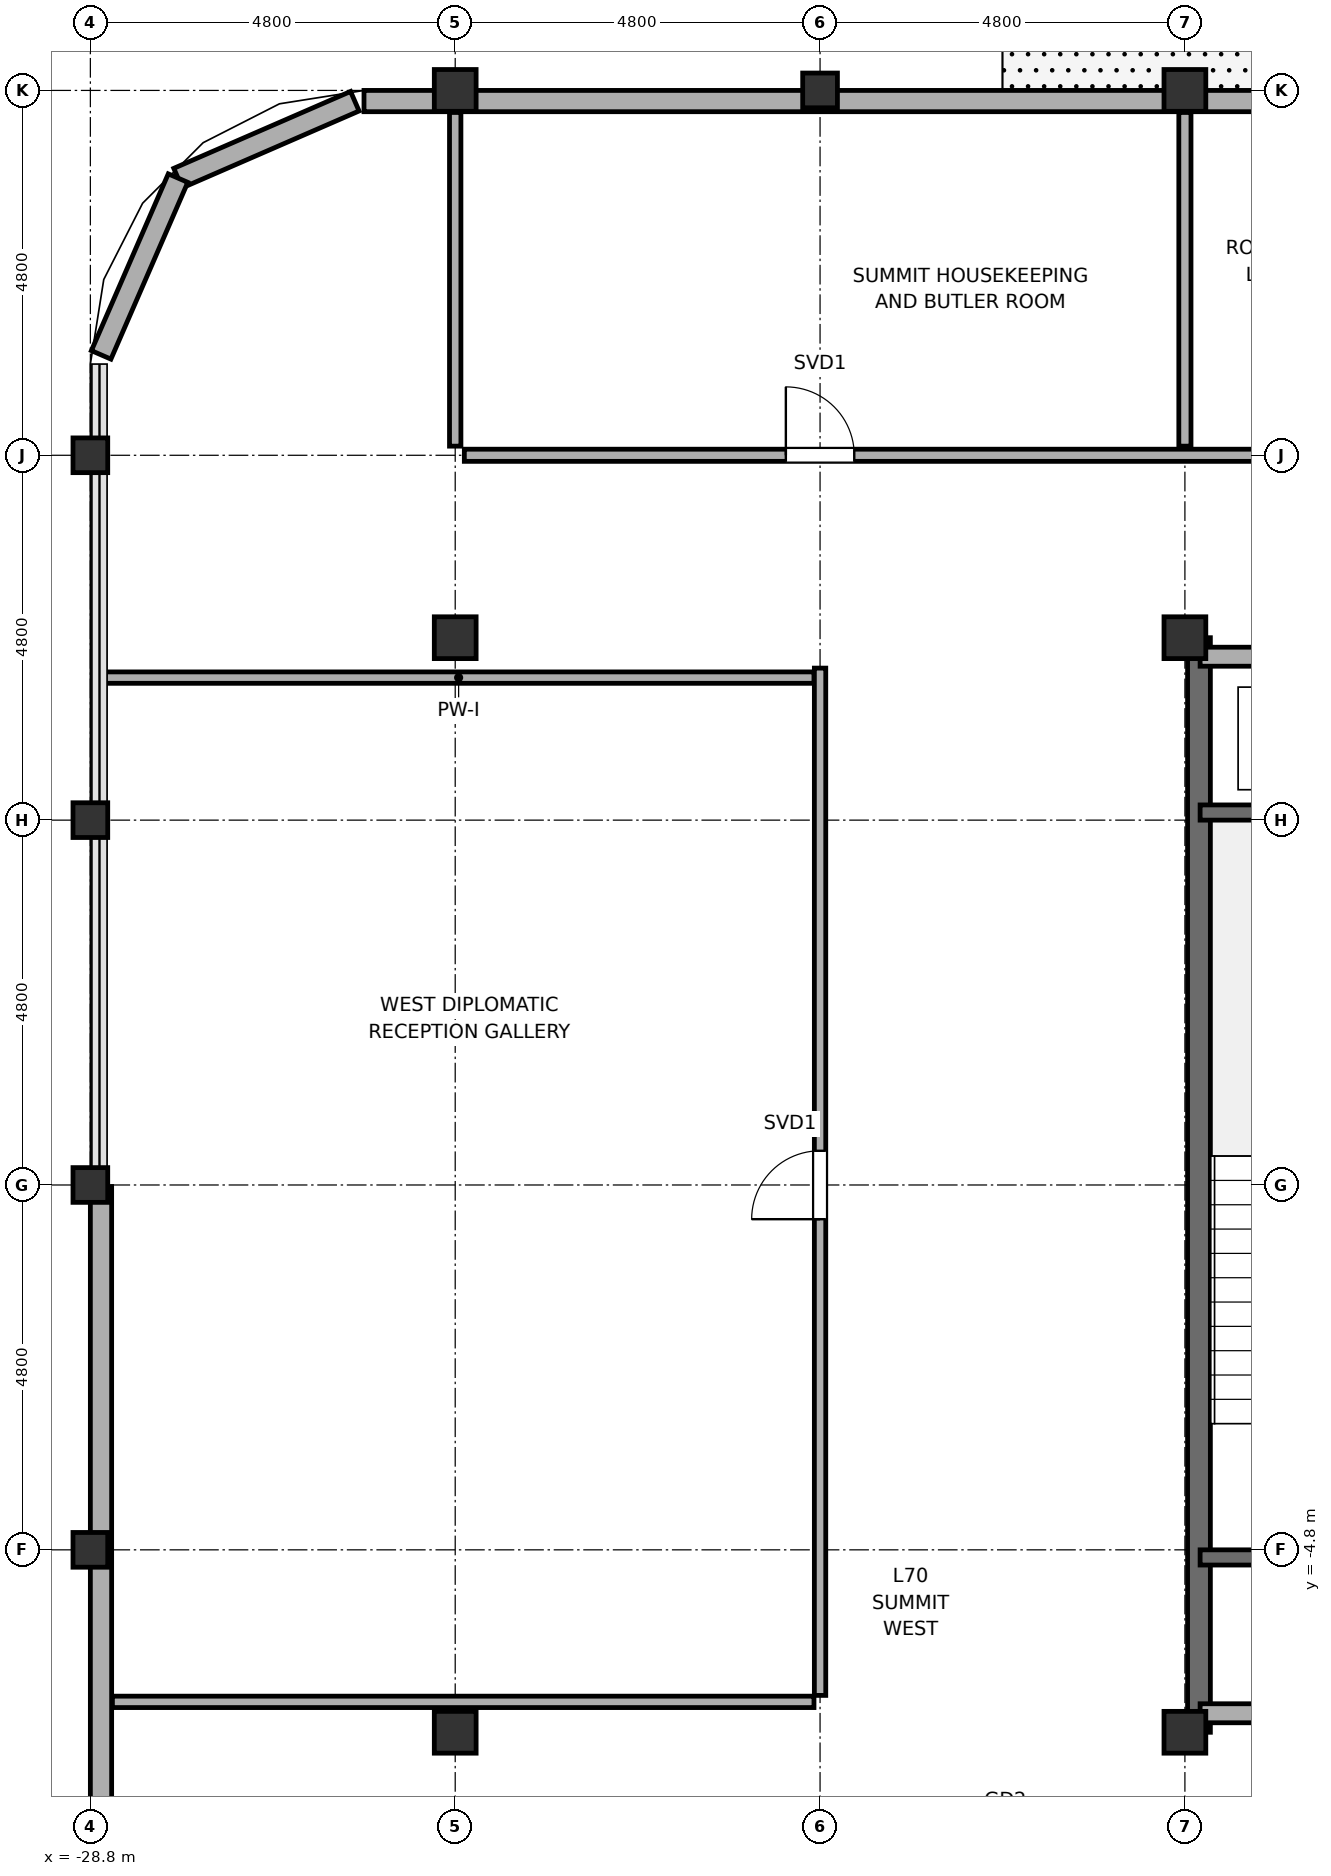
"""IFC4 building model, lengths in metres.
Left out: names, types, materials, properties, quantities, classifications, styles, units other than length and angle.
Written with IfcOpenShell. Run it as: python <this file> out.ifc"""

import sys

from ifc_helpers import new_model, si_unit, direction, frame, frame_2d, origin, origin_2d, place, context, subcontext, project, spatial, rectangle, hollow_rectangle, hollow_circle, extrude, element, fill, save


model = new_model("IFC4")
c1 = context("Model", 3, precision=1e-05, world=origin(), true_north=direction((0.0, 1.0)))
c2 = subcontext(c1, "Body", "Model", "MODEL_VIEW")
j1 = project(units=[si_unit("LENGTHUNIT", "METRE"), si_unit("PLANEANGLEUNIT", "RADIAN")], contexts=[c1])
p1 = place(None, origin())
s1 = spatial("IfcSite", under=j1, at=p1, CompositionType="ELEMENT")
p2 = place(p1, origin())
s2 = spatial("IfcBuilding", under=s1, at=p2, CompositionType="ELEMENT")
p3 = place(p2, frame((0.0, 0.0, 282.2)))
s3 = spatial("IfcBuildingStorey", under=s2, at=p3, CompositionType="ELEMENT", Elevation=282.2)
for number, where, z_axis, x_axis in (
    (1, (-28.8, -4.8, 0.0), (0.0, 0.0, 1.0), (1.0, 0.0, 0.0)),
    (2, (-28.8, 0.0, 0.0), (0.0, 0.0, 1.0), (1.0, 0.0, 0.0)),
    (3, (-28.8, 4.8, 0.0), (0.0, 0.0, 1.0), (1.0, 0.0, 0.0)),
    (4, (-28.8, 9.6, 0.0), (0.0, 0.0, 1.0), (1.0, 0.0, 0.0)),
):
    element("IfcColumn", number, at=place(p3, frame(where, z_axis=z_axis, x_axis=x_axis)), inside=s3, PredefinedType="COLUMN", context=c2, shape_type="SweptSolid", body=[
        extrude(hollow_circle(Radius=0.229, WallThickness=0.02, at=origin_2d()), origin(), (0.0, 0.0, 1.0), 4.2),
    ])
for number, where, z_axis, x_axis in (
    (5, (-24.0, -7.2, 0.0), (0.0, 0.0, 1.0), (1.0, 0.0, 0.0)),
    (6, (-24.0, 7.2, 0.0), (0.0, 0.0, 1.0), (1.0, 0.0, 0.0)),
    (7, (-24.0, 14.4, 0.0), (0.0, 0.0, 1.0), (1.0, 0.0, 0.0)),
):
    element("IfcColumn", number, at=place(p3, frame(where, z_axis=z_axis, x_axis=x_axis)), inside=s3, PredefinedType="COLUMN", context=c2, shape_type="SweptSolid", body=[
        extrude(hollow_rectangle(XDim=0.55, YDim=0.55, WallThickness=0.025, at=origin_2d()), origin(), (0.0, 0.0, 1.0), 4.2),
    ])
p4 = place(p3, frame((-19.2, 14.4, 0.0), z_axis=(0.0, 0.0, 1.0), x_axis=(1.0, 0.0, 0.0)))
e8 = element("IfcColumn", 8, at=p4, inside=s3, PredefinedType="COLUMN", context=c2, shape_type="SweptSolid", body=[
    extrude(hollow_circle(Radius=0.229, WallThickness=0.02, at=origin_2d()), origin(), (0.0, 0.0, 1.0), 4.2),
])
for number, where, z_axis, x_axis in (
    (9, (-14.4, -7.2, 0.0), (0.0, 0.0, 1.0), (1.0, 0.0, 0.0)),
    (10, (-14.4, 7.2, 0.0), (0.0, 0.0, 1.0), (1.0, 0.0, 0.0)),
    (11, (-14.4, 14.4, 0.0), (0.0, 0.0, 1.0), (1.0, 0.0, 0.0)),
):
    element("IfcColumn", number, at=place(p3, frame(where, z_axis=z_axis, x_axis=x_axis)), inside=s3, PredefinedType="COLUMN", context=c2, shape_type="SweptSolid", body=[
        extrude(hollow_rectangle(XDim=0.55, YDim=0.55, WallThickness=0.025, at=origin_2d()), origin(), (0.0, 0.0, 1.0), 4.2),
    ])
p5 = place(p3, frame((-14.215, -7.2, -0.2), z_axis=(0.0, 0.0, 1.0), x_axis=(0.0, 1.0, 0.0)))
e12 = element("IfcWall", 12, at=p5, inside=s3, PredefinedType="SHEAR", context=c2, shape_type="SweptSolid", body=[
    extrude(rectangle(XDim=14.4, YDim=0.3, at=frame_2d((7.2, 0.0))), origin(), (0.0, 0.0, 1.0), 4.2),
])
for number, where, z_axis, x_axis in (
    (13, (-25.321, 14.258, 0.0), (0.0, 0.0, 1.0), (-0.917, -0.399, 0.0)),
    (14, (-27.646, 13.247, 0.0), (0.0, 0.0, 1.0), (-0.399, -0.917, 0.0)),
):
    element("IfcWall", number, at=place(p3, frame(where, z_axis=z_axis, x_axis=x_axis)), inside=s3, PredefinedType="SOLIDWALL", context=c2, shape_type="SweptSolid", body=[
        extrude(rectangle(XDim=2.536, YDim=0.28, at=frame_2d((1.268, 0.0))), origin(), (0.0, 0.0, 1.0), 2.6),
    ])
p6 = place(p3, frame((-25.2, 14.26, 0.0), z_axis=(0.0, 0.0, 1.0), x_axis=(1.0, 0.0, 0.0)))
e15 = element("IfcWall", 15, at=p6, inside=s3, PredefinedType="SOLIDWALL", context=c2, shape_type="SweptSolid", body=[
    extrude(rectangle(XDim=20.45, YDim=0.28, at=frame_2d((10.225, 0.0))), origin(), (0.0, 0.0, 1.0), 2.6),
])
p7 = place(p6, frame((12.3, 0.0, 0.0)))
e16 = element("IfcOpeningElement", 16, at=p7, cuts=e15, PredefinedType="OPENING", context=c2, shape_type="SweptSolid", body=[
    extrude(rectangle(XDim=1.8, YDim=2.2, at=frame_2d((0.9, 1.1))), frame((0.0, 0.155, 0.0), z_axis=(0.0, -1.0, 0.0), x_axis=(1.0, 0.0, 0.0)), (0.0, 0.0, 1.0), 0.31),
])
p8 = place(p6, frame((16.54, 0.0, 0.75)))
e17 = element("IfcOpeningElement", 17, at=p8, cuts=e15, PredefinedType="OPENING", context=c2, shape_type="SweptSolid", body=[
    extrude(rectangle(XDim=2.8, YDim=1.7, at=frame_2d((1.4, 0.85))), frame((0.0, 0.155, 0.0), z_axis=(0.0, -1.0, 0.0), x_axis=(1.0, 0.0, 0.0)), (0.0, 0.0, 1.0), 0.31),
])
p9 = place(p3, frame((-28.66, -20.4, 0.0), z_axis=(0.0, 0.0, 1.0), x_axis=(0.0, 1.0, 0.0)))
e18 = element("IfcWall", 18, at=p9, inside=s3, PredefinedType="SOLIDWALL", context=c2, shape_type="SweptSolid", body=[
    extrude(rectangle(XDim=20.38, YDim=0.28, at=frame_2d((10.19, 0.0))), origin(), (0.0, 0.0, 1.0), 2.6),
])
p10 = place(p3, frame((-14.2, -6.95, 0.0), z_axis=(0.0, 0.0, 1.0), x_axis=(1.0, 0.0, 0.0)))
e19 = element("IfcWall", 19, at=p10, inside=s3, PredefinedType="SOLIDWALL", context=c2, shape_type="SweptSolid", body=[
    extrude(rectangle(XDim=9.4, YDim=0.25, at=frame_2d((4.7, 0.0))), origin(), (0.0, 0.0, 1.0), 2.6),
])
p11 = place(p10, frame((4.9, 0.0, 0.0)))
e20 = element("IfcOpeningElement", 20, at=p11, cuts=e19, PredefinedType="OPENING", context=c2, shape_type="SweptSolid", body=[
    extrude(rectangle(XDim=1.0, YDim=2.15, at=frame_2d((0.5, 1.075))), frame((0.0, 0.14, 0.0), z_axis=(0.0, -1.0, 0.0), x_axis=(1.0, 0.0, 0.0)), (0.0, 0.0, 1.0), 0.28),
])
p12 = place(p3, frame((-14.2, 6.95, 0.0), z_axis=(0.0, 0.0, 1.0), x_axis=(1.0, 0.0, 0.0)))
e21 = element("IfcWall", 21, at=p12, inside=s3, PredefinedType="SOLIDWALL", context=c2, shape_type="SweptSolid", body=[
    extrude(rectangle(XDim=9.4, YDim=0.25, at=frame_2d((4.7, 0.0))), origin(), (0.0, 0.0, 1.0), 2.6),
])
p13 = place(p12, frame((4.9, 0.0, 0.0)))
e22 = element("IfcOpeningElement", 22, at=p13, cuts=e21, PredefinedType="OPENING", context=c2, shape_type="SweptSolid", body=[
    extrude(rectangle(XDim=1.0, YDim=2.15, at=frame_2d((0.5, 1.075))), frame((0.0, 0.14, 0.0), z_axis=(0.0, -1.0, 0.0), x_axis=(1.0, 0.0, 0.0)), (0.0, 0.0, 1.0), 0.28),
])
for number, where, z_axis, x_axis in (
    (23, (-14.2, -4.9, -0.2), (0.0, 0.0, 1.0), (1.0, 0.0, 0.0)),
    (24, (-14.2, 4.9, -0.2), (0.0, 0.0, 1.0), (1.0, 0.0, 0.0)),
):
    element("IfcWall", number, at=place(p3, frame(where, z_axis=z_axis, x_axis=x_axis)), inside=s3, PredefinedType="SOLIDWALL", context=c2, shape_type="SweptSolid", body=[
        extrude(rectangle(XDim=3.65, YDim=0.2, at=frame_2d((1.825, 0.0))), origin(), (0.0, 0.0, 1.0), 4.2),
    ])
p14 = place(p3, frame((-28.51, -6.8, 0.0), z_axis=(0.0, 0.0, 1.0), x_axis=(1.0, 0.0, 0.0)))
e25 = element("IfcWall", 25, at=p14, inside=s3, PredefinedType="PARTITIONING", context=c2, shape_type="SweptSolid", body=[
    extrude(rectangle(XDim=9.23, YDim=0.15, at=frame_2d((4.615, 0.0))), origin(), (0.0, 0.0, 1.0), 2.6),
])
p15 = place(p3, frame((-28.63, 6.675, 0.0), z_axis=(0.0, 0.0, 1.0), x_axis=(1.0, 0.0, 0.0)))
e26 = element("IfcWall", 26, at=p15, inside=s3, PredefinedType="PARTITIONING", context=c2, shape_type="SweptSolid", body=[
    extrude(rectangle(XDim=9.35, YDim=0.15, at=frame_2d((4.675, 0.0))), origin(), (0.0, 0.0, 1.0), 3.56),
])
p16 = place(p3, frame((-23.88, 9.6, 0.0), z_axis=(0.0, 0.0, 1.0), x_axis=(1.0, 0.0, 0.0)))
e27 = element("IfcWall", 27, at=p16, inside=s3, PredefinedType="PARTITIONING", context=c2, shape_type="SweptSolid", body=[
    extrude(rectangle(XDim=42.96, YDim=0.16, at=frame_2d((21.48, 0.0))), origin(), (0.0, 0.0, 1.0), 2.6),
])
p17 = place(p16, frame((4.23, 0.0, 0.0)))
e28 = element("IfcOpeningElement", 28, at=p17, cuts=e27, PredefinedType="OPENING", context=c2, shape_type="SweptSolid", body=[
    extrude(rectangle(XDim=0.9, YDim=2.1, at=frame_2d((0.45, 1.05))), frame((0.0, 0.095, 0.0), z_axis=(0.0, -1.0, 0.0), x_axis=(1.0, 0.0, 0.0)), (0.0, 0.0, 1.0), 0.19),
])
p18 = place(p16, frame((11.415, 0.0, 0.0)))
e29 = element("IfcOpeningElement", 29, at=p18, cuts=e27, PredefinedType="OPENING", context=c2, shape_type="SweptSolid", body=[
    extrude(rectangle(XDim=1.05, YDim=2.2, at=frame_2d((0.525, 1.1))), frame((0.0, 0.095, 0.0), z_axis=(0.0, -1.0, 0.0), x_axis=(1.0, 0.0, 0.0)), (0.0, 0.0, 1.0), 0.19),
])
p19 = place(p16, frame((30.63, 0.0, 0.0)))
e30 = element("IfcOpeningElement", 30, at=p19, cuts=e27, PredefinedType="OPENING", context=c2, shape_type="SweptSolid", body=[
    extrude(rectangle(XDim=0.9, YDim=2.1, at=frame_2d((0.45, 1.05))), frame((0.0, 0.095, 0.0), z_axis=(0.0, -1.0, 0.0), x_axis=(1.0, 0.0, 0.0)), (0.0, 0.0, 1.0), 0.19),
])
p20 = place(p3, frame((-24.0, 9.72, 0.0), z_axis=(0.0, 0.0, 1.0), x_axis=(0.0, 1.0, 0.0)))
e31 = element("IfcWall", 31, at=p20, inside=s3, PredefinedType="PARTITIONING", context=c2, shape_type="SweptSolid", body=[
    extrude(rectangle(XDim=4.39, YDim=0.15, at=frame_2d((2.195, 0.0))), origin(), (0.0, 0.0, 1.0), 2.6),
])
p21 = place(p3, frame((-19.2, -6.715, 0.0), z_axis=(0.0, 0.0, 1.0), x_axis=(0.0, 1.0, 0.0)))
e32 = element("IfcWall", 32, at=p21, inside=s3, PredefinedType="PARTITIONING", context=c2, shape_type="SweptSolid", body=[
    extrude(rectangle(XDim=13.515, YDim=0.15, at=frame_2d((6.758, 0.0))), origin(), (0.0, 0.0, 1.0), 2.6),
])
p22 = place(p21, frame((6.265, 0.0, 0.0)))
e33 = element("IfcOpeningElement", 33, at=p22, cuts=e32, PredefinedType="OPENING", context=c2, shape_type="SweptSolid", body=[
    extrude(rectangle(XDim=0.9, YDim=2.1, at=frame_2d((0.45, 1.05))), frame((0.0, 0.09, 0.0), z_axis=(0.0, -1.0, 0.0), x_axis=(1.0, 0.0, 0.0)), (0.0, 0.0, 1.0), 0.18),
])
p23 = place(p3, frame((-14.4, 9.72, 0.0), z_axis=(0.0, 0.0, 1.0), x_axis=(0.0, 1.0, 0.0)))
e34 = element("IfcWall", 34, at=p23, inside=s3, PredefinedType="PARTITIONING", context=c2, shape_type="SweptSolid", body=[
    extrude(rectangle(XDim=4.39, YDim=0.16, at=frame_2d((2.195, 0.0))), origin(), (0.0, 0.0, 1.0), 2.6),
])
p24 = place(p17, origin())
e35 = element("IfcDoor", 35, at=p24, inside=s3, OperationType="SINGLE_SWING_LEFT", PredefinedType="DOOR", context=c2, shape_type="SweptSolid", body=[
    extrude(rectangle(XDim=0.9, YDim=2.1, at=frame_2d((0.45, 1.05))), frame((0.0, 0.025, 0.0), z_axis=(0.0, -1.0, 0.0), x_axis=(1.0, 0.0, 0.0)), (0.0, 0.0, 1.0), 0.05),
])
fill(e28, e35)
p25 = place(p22, origin())
e36 = element("IfcDoor", 36, at=p25, inside=s3, OperationType="SINGLE_SWING_LEFT", PredefinedType="DOOR", context=c2, shape_type="SweptSolid", body=[
    extrude(rectangle(XDim=0.9, YDim=2.1, at=frame_2d((0.45, 1.05))), frame((0.0, 0.025, 0.0), z_axis=(0.0, -1.0, 0.0), x_axis=(1.0, 0.0, 0.0)), (0.0, 0.0, 1.0), 0.05),
])
fill(e33, e36)
save(model, sys.argv[1])
